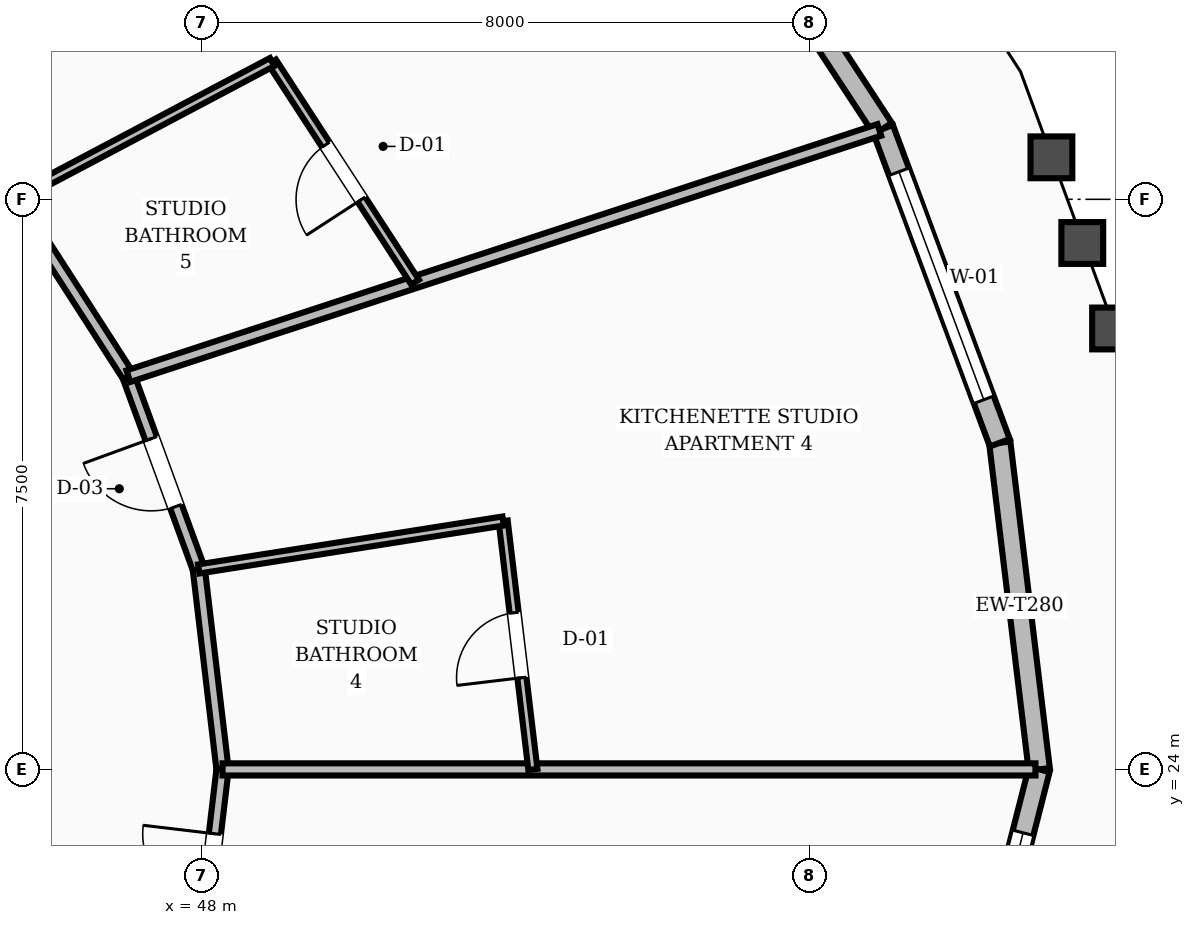
"""IFC4 building model, lengths in metres.
Left out: names, types, materials, properties, quantities, classifications, styles, units other than length and angle.
Written with IfcOpenShell. Run it as: python <this file> out.ifc"""

import sys

from ifc_helpers import new_model, si_unit, direction, frame, frame_2d, origin, place, context, subcontext, project, spatial, rectangle, extrude, element, fill, save


model = new_model("IFC4")
c1 = context("Model", 3, precision=1e-05, world=origin(), true_north=direction((0.0, 1.0)))
c2 = subcontext(c1, "Body", "Model", "MODEL_VIEW")
j1 = project(units=[si_unit("LENGTHUNIT", "METRE"), si_unit("PLANEANGLEUNIT", "RADIAN")], contexts=[c1])
p1 = place(None, origin())
s1 = spatial("IfcSite", under=j1, at=p1, CompositionType="ELEMENT")
p2 = place(p1, origin())
s2 = spatial("IfcBuilding", under=s1, at=p2, CompositionType="ELEMENT")
p3 = place(p2, frame((0.0, 0.0, 84.4)))
s3 = spatial("IfcBuildingStorey", under=s2, at=p3, CompositionType="ELEMENT", Elevation=84.4)
p4 = place(p3, frame((59.019, 24.0, 0.0), z_axis=(0.0, 0.0, 1.0), x_axis=(-0.119979283707, 0.99277639551, 0.0)))
e1 = element("IfcWall", 1, at=p4, inside=s3, PredefinedType="STANDARD", context=c2, shape_type="SweptSolid", body=[
    extrude(rectangle(XDim=4.328, YDim=0.28, at=frame_2d((2.164, 0.0))), origin(), (0.0, 0.0, 1.0), 2.71),
])
p5 = place(p3, frame((58.5, 28.297, 0.0), z_axis=(0.0, 0.0, 1.0), x_axis=(-0.348719005739, 0.937227323031, 0.0)))
e2 = element("IfcWall", 2, at=p5, inside=s3, PredefinedType="STANDARD", context=c2, shape_type="SweptSolid", body=[
    extrude(rectangle(XDim=4.409, YDim=0.28, at=frame_2d((2.204, 0.0))), origin(), (0.0, 0.0, 1.0), 2.71),
])
p6 = place(p5, frame((0.604, 0.0, 0.8)))
e3 = element("IfcOpeningElement", 3, at=p6, cuts=e2, PredefinedType="OPENING", context=c2, shape_type="SweptSolid", body=[
    extrude(rectangle(XDim=3.2, YDim=1.65, at=frame_2d((1.6, 0.825))), frame((0.0, 0.15, 0.0), z_axis=(0.0, -1.0, 0.0), x_axis=(1.0, 0.0, 0.0)), (0.0, 0.0, 1.0), 0.3),
])
p7 = place(p3, frame((56.962, 32.429, 0.0), z_axis=(0.0, 0.0, 1.0), x_axis=(-0.548336678248, 0.836257668, 0.0)))
e4 = element("IfcWall", 4, at=p7, inside=s3, PredefinedType="STANDARD", context=c2, shape_type="SweptSolid", body=[
    extrude(rectangle(XDim=4.553, YDim=0.28, at=frame_2d((2.277, 0.0))), origin(), (0.0, 0.0, 1.0), 2.71),
])
p8 = place(p3, frame((57.928, 19.723, 0.0), z_axis=(0.0, 0.0, 1.0), x_axis=(0.24719210279, 0.968966492877, 0.0)))
e5 = element("IfcWall", 5, at=p8, inside=s3, PredefinedType="STANDARD", context=c2, shape_type="SweptSolid", body=[
    extrude(rectangle(XDim=4.414, YDim=0.28, at=frame_2d((2.207, 0.0))), origin(), (0.0, 0.0, 1.0), 2.71),
])
p9 = place(p8, frame((0.953, 0.0, 0.8)))
e6 = element("IfcOpeningElement", 6, at=p9, cuts=e5, PredefinedType="OPENING", context=c2, shape_type="SweptSolid", body=[
    extrude(rectangle(XDim=2.6, YDim=1.65, at=frame_2d((1.3, 0.825))), frame((0.0, 0.15, 0.0), z_axis=(0.0, -1.0, 0.0), x_axis=(1.0, 0.0, 0.0)), (0.0, 0.0, 1.0), 0.3),
])
p10 = place(p3, frame((48.274, 24.0, 0.0), z_axis=(0.0, 0.0, 1.0), x_axis=(-0.117763961213, 0.99304161516, 0.0)))
e7 = element("IfcWall", 7, at=p10, inside=s3, PredefinedType="SOLIDWALL", context=c2, shape_type="SweptSolid", body=[
    extrude(rectangle(XDim=2.656, YDim=0.16, at=frame_2d((1.328, 0.0))), origin(), (0.0, 0.0, 1.0), 2.71),
])
p11 = place(p3, frame((47.961, 26.637, 0.0), z_axis=(0.0, 0.0, 1.0), x_axis=(-0.343013437329, 0.939330496583, 0.0)))
e8 = element("IfcWall", 8, at=p11, inside=s3, PredefinedType="SOLIDWALL", context=c2, shape_type="SweptSolid", body=[
    extrude(rectangle(XDim=2.7, YDim=0.16, at=frame_2d((1.35, 0.0))), origin(), (0.0, 0.0, 1.0), 2.71),
])
p12 = place(p11, frame((0.875, 0.0, 0.0)))
e9 = element("IfcOpeningElement", 9, at=p12, cuts=e8, PredefinedType="OPENING", context=c2, shape_type="SweptSolid", body=[
    extrude(rectangle(XDim=0.95, YDim=2.1, at=frame_2d((0.475, 1.05))), frame((0.0, 0.09, 0.0), z_axis=(0.0, -1.0, 0.0), x_axis=(1.0, 0.0, 0.0)), (0.0, 0.0, 1.0), 0.18),
])
p13 = place(p3, frame((47.035, 29.173, 0.0), z_axis=(0.0, 0.0, 1.0), x_axis=(-0.541126045017, 0.840941498206, 0.0)))
e10 = element("IfcWall", 10, at=p13, inside=s3, PredefinedType="SOLIDWALL", context=c2, shape_type="SweptSolid", body=[
    extrude(rectangle(XDim=2.779, YDim=0.16, at=frame_2d((1.39, 0.0))), origin(), (0.0, 0.0, 1.0), 2.71),
])
p14 = place(p3, frame((47.961, 21.363, 0.0), z_axis=(0.0, 0.0, 1.0), x_axis=(0.117763961213, 0.99304161516, 0.0)))
e11 = element("IfcWall", 11, at=p14, inside=s3, PredefinedType="SOLIDWALL", context=c2, shape_type="SweptSolid", body=[
    extrude(rectangle(XDim=2.656, YDim=0.16, at=frame_2d((1.328, 0.0))), origin(), (0.0, 0.0, 1.0), 2.71),
])
p15 = place(p14, frame((0.853, 0.0, 0.0)))
e12 = element("IfcOpeningElement", 12, at=p15, cuts=e11, PredefinedType="OPENING", context=c2, shape_type="SweptSolid", body=[
    extrude(rectangle(XDim=0.95, YDim=2.1, at=frame_2d((0.475, 1.05))), frame((0.0, 0.09, 0.0), z_axis=(0.0, -1.0, 0.0), x_axis=(1.0, 0.0, 0.0)), (0.0, 0.0, 1.0), 0.18),
])
p16 = place(p3, frame((48.274, 24.0, 0.0), z_axis=(0.0, 0.0, 1.0), x_axis=(1.0, 0.0, 0.0)))
e13 = element("IfcWall", 13, at=p16, inside=s3, PredefinedType="SOLIDWALL", context=c2, shape_type="SweptSolid", body=[
    extrude(rectangle(XDim=10.695, YDim=0.16, at=frame_2d((5.348, 0.0))), origin(), (0.0, 0.0, 1.0), 2.71),
])
p17 = place(p3, frame((52.357, 24.0, 0.0), z_axis=(0.0, 0.0, 1.0), x_axis=(-0.118911209682, 0.992904891826, 0.0)))
e14 = element("IfcWall", 14, at=p17, inside=s3, PredefinedType="PARTITIONING", context=c2, shape_type="SweptSolid", body=[
    extrude(rectangle(XDim=3.291, YDim=0.12, at=frame_2d((1.646, 0.0))), origin(), (0.0, 0.0, 1.0), 2.71),
])
p18 = place(p17, frame((1.216, 0.0, 0.0)))
e15 = element("IfcOpeningElement", 15, at=p18, cuts=e14, PredefinedType="OPENING", context=c2, shape_type="SweptSolid", body=[
    extrude(rectangle(XDim=0.86, YDim=2.1, at=frame_2d((0.43, 1.05))), frame((0.0, 0.07, 0.0), z_axis=(0.0, -1.0, 0.0), x_axis=(1.0, 0.0, 0.0)), (0.0, 0.0, 1.0), 0.14),
])
p19 = place(p3, frame((47.961, 26.637, 0.0), z_axis=(0.0, 0.0, 1.0), x_axis=(0.987827335178, 0.155554350227, 0.0)))
e16 = element("IfcWall", 16, at=p19, inside=s3, PredefinedType="PARTITIONING", context=c2, shape_type="SweptSolid", body=[
    extrude(rectangle(XDim=4.054, YDim=0.12, at=frame_2d((2.027, 0.0))), origin(), (0.0, 0.0, 1.0), 2.71),
])
p20 = place(p3, frame((47.035, 29.173, 0.0), z_axis=(0.0, 0.0, 1.0), x_axis=(0.95020777267, 0.311617054664, 0.0)))
e17 = element("IfcWall", 17, at=p20, inside=s3, PredefinedType="SOLIDWALL", context=c2, shape_type="SweptSolid", body=[
    extrude(rectangle(XDim=10.397, YDim=0.16, at=frame_2d((5.199, 0.0))), origin(), (0.0, 0.0, 1.0), 2.71),
])
p21 = place(p3, frame((50.808, 30.41, 0.0), z_axis=(0.0, 0.0, 1.0), x_axis=(-0.544774633125, 0.838582493917, 0.0)))
e18 = element("IfcWall", 18, at=p21, inside=s3, PredefinedType="PARTITIONING", context=c2, shape_type="SweptSolid", body=[
    extrude(rectangle(XDim=3.453, YDim=0.12, at=frame_2d((1.727, 0.0))), origin(), (0.0, 0.0, 1.0), 2.71),
])
p22 = place(p21, frame((1.297, 0.0, 0.0)))
e19 = element("IfcOpeningElement", 19, at=p22, cuts=e18, PredefinedType="OPENING", context=c2, shape_type="SweptSolid", body=[
    extrude(rectangle(XDim=0.86, YDim=2.1, at=frame_2d((0.43, 1.05))), frame((0.0, 0.07, 0.0), z_axis=(0.0, -1.0, 0.0), x_axis=(1.0, 0.0, 0.0)), (0.0, 0.0, 1.0), 0.14),
])
p23 = place(p3, frame((45.531, 31.51, 0.0), z_axis=(0.0, 0.0, 1.0), x_axis=(0.883945577966, 0.467589793723, 0.0)))
e20 = element("IfcWall", 20, at=p23, inside=s3, PredefinedType="PARTITIONING", context=c2, shape_type="SweptSolid", body=[
    extrude(rectangle(XDim=3.841, YDim=0.12, at=frame_2d((1.92, 0.0))), origin(), (0.0, 0.0, 1.0), 2.71),
])
p24 = place(p6, origin())
e21 = element("IfcWindow", 21, at=p24, inside=s3, PartitioningType="SINGLE_PANEL", PredefinedType="WINDOW", context=c2, shape_type="SweptSolid", body=[
    extrude(rectangle(XDim=3.2, YDim=1.65, at=frame_2d((1.6, 0.825))), frame((0.0, 0.03, 0.0), z_axis=(0.0, -1.0, 0.0), x_axis=(1.0, 0.0, 0.0)), (0.0, 0.0, 1.0), 0.06),
])
fill(e3, e21)
p25 = place(p9, origin())
e22 = element("IfcWindow", 22, at=p25, inside=s3, PartitioningType="SINGLE_PANEL", PredefinedType="WINDOW", context=c2, shape_type="SweptSolid", body=[
    extrude(rectangle(XDim=2.6, YDim=1.65, at=frame_2d((1.3, 0.825))), frame((0.0, 0.03, 0.0), z_axis=(0.0, -1.0, 0.0), x_axis=(1.0, 0.0, 0.0)), (0.0, 0.0, 1.0), 0.06),
])
fill(e6, e22)
p26 = place(p15, origin())
e23 = element("IfcDoor", 23, at=p26, inside=s3, OperationType="SINGLE_SWING_RIGHT", PredefinedType="DOOR", context=c2, shape_type="SweptSolid", body=[
    extrude(rectangle(XDim=0.95, YDim=2.1, at=frame_2d((0.475, 1.05))), frame((0.0, 0.025, 0.0), z_axis=(0.0, -1.0, 0.0), x_axis=(1.0, 0.0, 0.0)), (0.0, 0.0, 1.0), 0.05),
])
fill(e12, e23)
p27 = place(p18, origin())
e24 = element("IfcDoor", 24, at=p27, inside=s3, OperationType="SINGLE_SWING_LEFT", PredefinedType="DOOR", context=c2, shape_type="SweptSolid", body=[
    extrude(rectangle(XDim=0.86, YDim=2.1, at=frame_2d((0.43, 1.05))), frame((0.0, 0.025, 0.0), z_axis=(0.0, -1.0, 0.0), x_axis=(1.0, 0.0, 0.0)), (0.0, 0.0, 1.0), 0.05),
])
fill(e15, e24)
p28 = place(p12, origin())
e25 = element("IfcDoor", 25, at=p28, inside=s3, OperationType="SINGLE_SWING_RIGHT", PredefinedType="DOOR", context=c2, shape_type="SweptSolid", body=[
    extrude(rectangle(XDim=0.95, YDim=2.1, at=frame_2d((0.475, 1.05))), frame((0.0, 0.025, 0.0), z_axis=(0.0, -1.0, 0.0), x_axis=(1.0, 0.0, 0.0)), (0.0, 0.0, 1.0), 0.05),
])
fill(e9, e25)
p29 = place(p22, origin())
e26 = element("IfcDoor", 26, at=p29, inside=s3, OperationType="SINGLE_SWING_LEFT", PredefinedType="DOOR", context=c2, shape_type="SweptSolid", body=[
    extrude(rectangle(XDim=0.86, YDim=2.1, at=frame_2d((0.43, 1.05))), frame((0.0, 0.025, 0.0), z_axis=(0.0, -1.0, 0.0), x_axis=(1.0, 0.0, 0.0)), (0.0, 0.0, 1.0), 0.05),
])
fill(e19, e26)
save(model, sys.argv[1])
